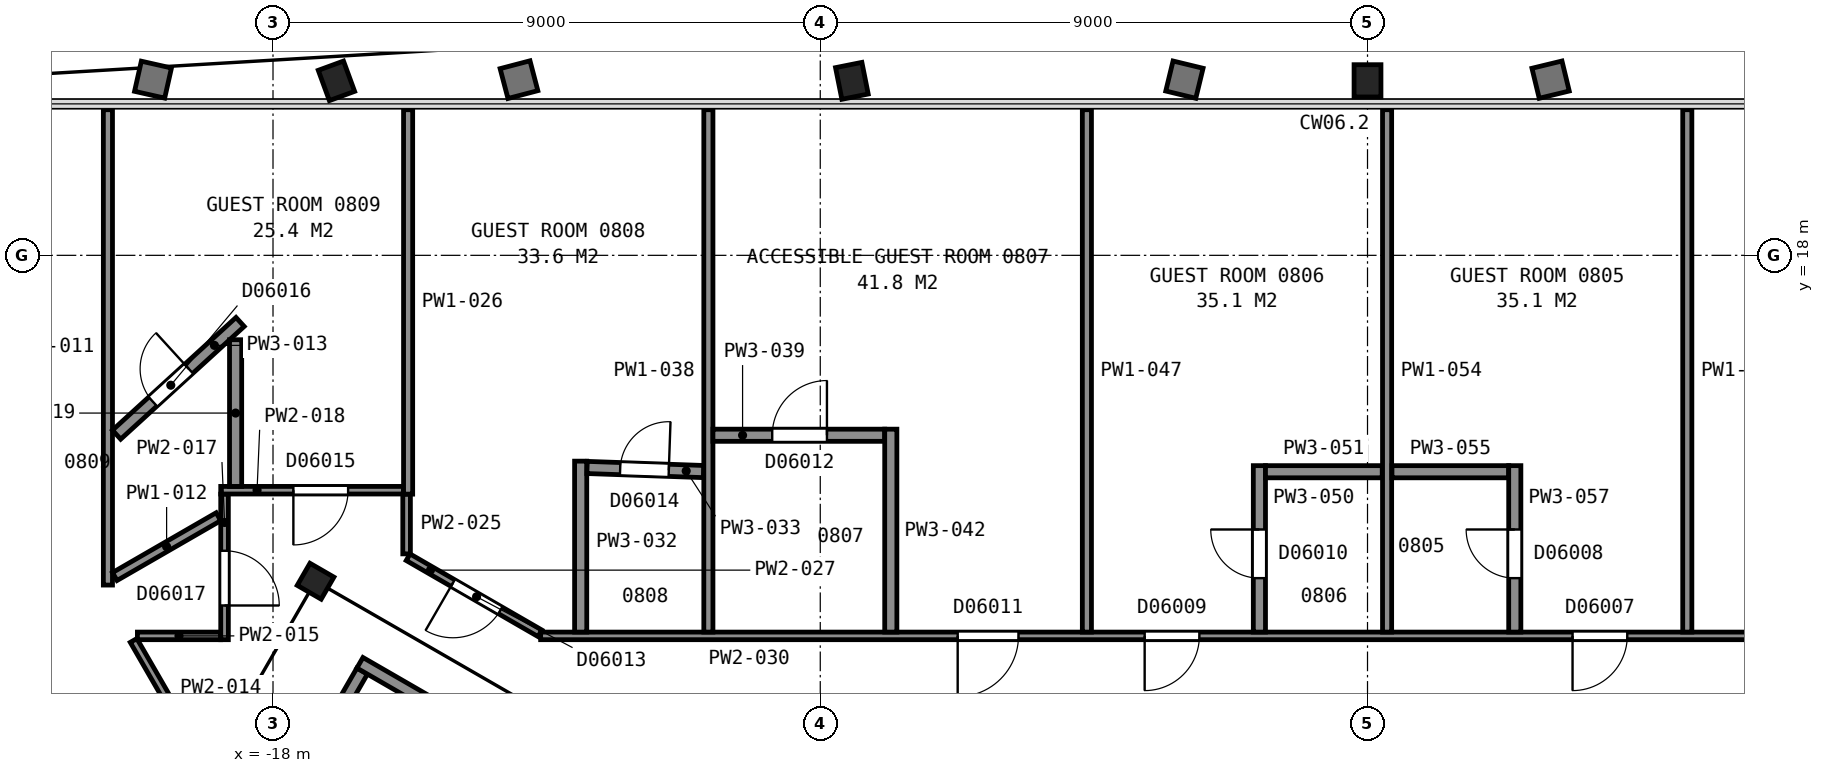
"""IFC4 building model, lengths in metres.
Left out: names, types, materials, properties, quantities, classifications, styles, units other than length and angle.
Written with IfcOpenShell. Run it as: python <this file> out.ifc"""

import sys

from ifc_helpers import new_model, si_unit, direction, frame, frame_2d, origin, origin_2d, place, context, subcontext, project, spatial, rectangle, i_section, extrude, element, fill, save


model = new_model("IFC4")
c1 = context("Model", 3, precision=1e-05, world=origin(), true_north=direction((0.0, 1.0)))
c2 = subcontext(c1, "Body", "Model", "MODEL_VIEW")
j1 = project(units=[si_unit("LENGTHUNIT", "METRE"), si_unit("PLANEANGLEUNIT", "RADIAN")], contexts=[c1])
p1 = place(None, origin())
s1 = spatial("IfcSite", under=j1, at=p1, CompositionType="ELEMENT")
p2 = place(p1, origin())
s2 = spatial("IfcBuilding", under=s1, at=p2, CompositionType="ELEMENT")
p3 = place(p2, frame((0.0, 0.0, 44.0)))
s3 = spatial("IfcBuildingStorey", under=s2, at=p3, CompositionType="ELEMENT", Elevation=44.0)
p4 = place(p3, frame((0.0, 20.772, 0.025), z_axis=(0.0, 0.082994433879, 0.99655001076), x_axis=(1.0, 0.0, 0.0)))
e1 = element("IfcColumn", 1, at=p4, inside=s3, PredefinedType="COLUMN", context=c2, shape_type="SweptSolid", body=[
    extrude(i_section(OverallWidth=0.442, OverallDepth=0.531, WebThickness=0.066, FlangeThickness=0.106, FilletRadius=0.015, at=origin_2d()), origin(), (0.0, 0.0, 1.0), 3.562),
])
p5 = place(p3, frame((-8.46, 20.772, 0.025), z_axis=(-0.016582899458, 0.082983021668, 0.996412979422), x_axis=(0.999861307838, -0.000158913268, 0.016653523173)))
e2 = element("IfcColumn", 2, at=p5, inside=s3, PredefinedType="COLUMN", context=c2, shape_type="SweptSolid", body=[
    extrude(i_section(OverallWidth=0.442, OverallDepth=0.531, WebThickness=0.066, FlangeThickness=0.106, FilletRadius=0.015, at=origin_2d()), origin(), (0.0, 0.0, 1.0), 3.563),
])
p6 = place(p3, frame((-16.921, 20.772, 0.025), z_axis=(-0.030414930255, 0.08295603725, 0.996088965857), x_axis=(0.999534085213, -2.6317342e-05, 0.030522316494)))
e3 = element("IfcColumn", 3, at=p6, inside=s3, PredefinedType="COLUMN", context=c2, shape_type="SweptSolid", body=[
    extrude(i_section(OverallWidth=0.442, OverallDepth=0.531, WebThickness=0.066, FlangeThickness=0.106, FilletRadius=0.015, at=origin_2d()), origin(), (0.0, 0.0, 1.0), 3.564),
])
p7 = place(p3, frame((-17.3, 12.64, 0.0), z_axis=(0.0, 0.0, 1.0), x_axis=(0.5, 0.866025403784, 0.0)))
e4 = element("IfcColumn", 4, at=p7, inside=s3, PredefinedType="COLUMN", context=c2, shape_type="SweptSolid", body=[
    extrude(i_section(OverallWidth=0.419, OverallDepth=0.455, WebThickness=0.042, FlangeThickness=0.068, FilletRadius=0.015, at=origin_2d()), origin(), (0.0, 0.0, 1.0), 3.6),
])
p8 = place(p3, frame((6.178, 5.299, 0.0), z_axis=(0.0, 0.0, 1.0), x_axis=(0.866026010844, 0.49999894854, 0.0)))
e5 = element("IfcWall", 5, at=p8, inside=s3, PredefinedType="PARTITIONING", context=c2, shape_type="SweptSolid", body=[
    extrude(rectangle(XDim=12.0, YDim=0.2, at=frame_2d((6.0, 0.0))), origin(), (0.0, 0.0, 1.0), 3.35),
])
p9 = place(p3, frame((-16.534, 11.162, 0.0), z_axis=(0.0, 0.0, 1.0), x_axis=(-0.49998411664, -0.866034573852, 0.0)))
e6 = element("IfcWall", 6, at=p9, inside=s3, PredefinedType="PARTITIONING", context=c2, shape_type="SweptSolid", body=[
    extrude(rectangle(XDim=2.8, YDim=0.2, at=frame_2d((1.4, 0.0))), origin(), (0.0, 0.0, 1.0), 3.35),
])
p10 = place(p9, frame((0.85, 0.0, 0.0)))
e7 = element("IfcOpeningElement", 7, at=p10, cuts=e6, PredefinedType="OPENING", context=c2, shape_type="SweptSolid", body=[
    extrude(rectangle(XDim=1.1, YDim=2.1, at=frame_2d((0.55, 1.05))), frame((0.0, 0.11, 0.0), z_axis=(0.0, -1.0, 0.0), x_axis=(1.0, 0.0, 0.0)), (0.0, 0.0, 1.0), 0.22),
])
p11 = place(p3, frame((-6.178, 5.299, 0.0), z_axis=(0.0, 0.0, 1.0), x_axis=(-0.866026010844, 0.49999894854, 0.0)))
e8 = element("IfcWall", 8, at=p11, inside=s3, PredefinedType="PARTITIONING", context=c2, shape_type="SweptSolid", body=[
    extrude(rectangle(XDim=12.0, YDim=0.2, at=frame_2d((6.0, 0.0))), origin(), (0.0, 0.0, 1.0), 3.35),
])
p12 = place(p3, frame((-20.715, 12.577, 0.0), z_axis=(0.0, 0.0, 1.0), x_axis=(0.0, 1.0, 0.0)))
e9 = element("IfcWall", 9, at=p12, inside=s3, PredefinedType="PARTITIONING", context=c2, shape_type="SweptSolid", body=[
    extrude(rectangle(XDim=7.818, YDim=0.15, at=frame_2d((3.909, 0.0))), origin(), (0.0, 0.0, 1.0), 2.613),
])
p13 = place(p3, frame((-20.602, 12.717, 0.0), z_axis=(0.0, 0.0, 1.0), x_axis=(0.866121584746, 0.499833372672, 0.0)))
e10 = element("IfcWall", 10, at=p13, inside=s3, PredefinedType="PARTITIONING", context=c2, shape_type="SweptSolid", body=[
    extrude(rectangle(XDim=1.969, YDim=0.15, at=frame_2d((0.984, 0.0))), origin(), (0.0, 0.0, 1.0), 2.613),
])
p14 = place(p3, frame((-18.541, 16.905, 0.0), z_axis=(0.0, 0.0, 1.0), x_axis=(-0.738508553587, -0.674244107337, 0.0)))
e11 = element("IfcWall", 11, at=p14, inside=s3, PredefinedType="PARTITIONING", context=c2, shape_type="SweptSolid", body=[
    extrude(rectangle(XDim=2.75, YDim=0.2, at=frame_2d((1.375, 0.0))), origin(), (0.0, 0.0, 1.0), 2.613),
])
p15 = place(p14, frame((1.143, 0.0, 0.0)))
e12 = element("IfcOpeningElement", 12, at=p15, cuts=e11, PredefinedType="OPENING", context=c2, shape_type="SweptSolid", body=[
    extrude(rectangle(XDim=0.8, YDim=2.1, at=frame_2d((0.4, 1.05))), frame((0.0, 0.11, 0.0), z_axis=(0.0, -1.0, 0.0), x_axis=(1.0, 0.0, 0.0)), (0.0, 0.0, 1.0), 0.22),
])
p16 = place(p3, frame((-20.293, 11.666, 0.0), z_axis=(0.0, 0.0, 1.0), x_axis=(0.500327160669, -0.865836435071, 0.0)))
e13 = element("IfcWall", 13, at=p16, inside=s3, PredefinedType="PARTITIONING", context=c2, shape_type="SweptSolid", body=[
    extrude(rectangle(XDim=1.805, YDim=0.125, at=frame_2d((0.903, 0.0))), origin(), (0.0, 0.0, 1.0), 2.613),
])
p17 = place(p3, frame((-20.23, 11.741, 0.0), z_axis=(0.0, 0.0, 1.0), x_axis=(1.0, 0.0, 0.0)))
e14 = element("IfcWall", 14, at=p17, inside=s3, PredefinedType="PARTITIONING", context=c2, shape_type="SweptSolid", body=[
    extrude(rectangle(XDim=1.368, YDim=0.125, at=frame_2d((0.684, 0.0))), origin(), (0.0, 0.0, 1.0), 2.613),
])
p18 = place(p3, frame((-18.797, 11.678, 0.0), z_axis=(0.0, 0.0, 1.0), x_axis=(0.0, 1.0, 0.0)))
e15 = element("IfcWall", 15, at=p18, inside=s3, PredefinedType="PARTITIONING", context=c2, shape_type="SweptSolid", body=[
    extrude(rectangle(XDim=2.394, YDim=0.125, at=frame_2d((1.197, 0.0))), origin(), (0.0, 0.0, 1.0), 2.613),
])
p19 = place(p18, frame((0.562, 0.0, 0.0)))
e16 = element("IfcOpeningElement", 16, at=p19, cuts=e15, PredefinedType="OPENING", context=c2, shape_type="SweptSolid", body=[
    extrude(rectangle(XDim=0.9, YDim=2.1, at=frame_2d((0.45, 1.05))), frame((0.0, 0.073, 0.0), z_axis=(0.0, -1.0, 0.0), x_axis=(1.0, 0.0, 0.0)), (0.0, 0.0, 1.0), 0.145),
])
p20 = place(p3, frame((-18.86, 14.137, 0.0), z_axis=(0.0, 0.0, 1.0), x_axis=(1.0, 0.0, 0.0)))
e17 = element("IfcWall", 17, at=p20, inside=s3, PredefinedType="PARTITIONING", context=c2, shape_type="SweptSolid", body=[
    extrude(rectangle(XDim=3.004, YDim=0.125, at=frame_2d((1.502, 0.0))), origin(), (0.0, 0.0, 1.0), 2.613),
])
p21 = place(p20, frame((1.195, 0.0, 0.0)))
e18 = element("IfcOpeningElement", 18, at=p21, cuts=e17, PredefinedType="OPENING", context=c2, shape_type="SweptSolid", body=[
    extrude(rectangle(XDim=0.9, YDim=2.1, at=frame_2d((0.45, 1.05))), frame((0.0, 0.073, 0.0), z_axis=(0.0, -1.0, 0.0), x_axis=(1.0, 0.0, 0.0)), (0.0, 0.0, 1.0), 0.145),
])
p22 = place(p3, frame((-18.615, 14.199, 0.0), z_axis=(0.0, 0.0, 1.0), x_axis=(0.0, 1.0, 0.0)))
e19 = element("IfcWall", 19, at=p22, inside=s3, PredefinedType="PARTITIONING", context=c2, shape_type="SweptSolid", body=[
    extrude(rectangle(XDim=2.413, YDim=0.2, at=frame_2d((1.206, 0.0))), origin(), (0.0, 0.0, 1.0), 2.613),
])
p23 = place(p3, frame((-15.803, 13.09, 0.0), z_axis=(0.0, 0.0, 1.0), x_axis=(0.0, 1.0, 0.0)))
e20 = element("IfcWall", 20, at=p23, inside=s3, PredefinedType="PARTITIONING", context=c2, shape_type="SweptSolid", body=[
    extrude(rectangle(XDim=0.982, YDim=0.125, at=frame_2d((0.491, 0.0))), origin(), (0.0, 0.0, 1.0), 2.613),
])
p24 = place(p3, frame((-15.778, 14.073, 0.0), z_axis=(0.0, 0.0, 1.0), x_axis=(0.0, 1.0, 0.0)))
e21 = element("IfcWall", 21, at=p24, inside=s3, PredefinedType="PARTITIONING", context=c2, shape_type="SweptSolid", body=[
    extrude(rectangle(XDim=6.323, YDim=0.15, at=frame_2d((3.161, 0.0))), origin(), (0.0, 0.0, 1.0), 2.613),
])
p25 = place(p3, frame((-15.778, 13.035, 0.0), z_axis=(0.0, 0.0, 1.0), x_axis=(0.866110899347, -0.499851888094, 0.0)))
e22 = element("IfcWall", 22, at=p25, inside=s3, PredefinedType="PARTITIONING", context=c2, shape_type="SweptSolid", body=[
    extrude(rectangle(XDim=2.504, YDim=0.125, at=frame_2d((1.252, 0.0))), origin(), (0.0, 0.0, 1.0), 2.613),
])
p26 = place(p25, frame((0.85, 0.0, 0.0)))
e23 = element("IfcOpeningElement", 23, at=p26, cuts=e22, PredefinedType="OPENING", context=c2, shape_type="SweptSolid", body=[
    extrude(rectangle(XDim=0.9, YDim=2.1, at=frame_2d((0.45, 1.05))), frame((0.0, 0.073, 0.0), z_axis=(0.0, -1.0, 0.0), x_axis=(1.0, 0.0, 0.0)), (0.0, 0.0, 1.0), 0.145),
])
p27 = place(p3, frame((-13.598, 11.741, 0.0), z_axis=(0.0, 0.0, 1.0), x_axis=(1.0, 0.0, 0.0)))
e24 = element("IfcWall", 24, at=p27, inside=s3, PredefinedType="PARTITIONING", context=c2, shape_type="SweptSolid", body=[
    extrude(rectangle(XDim=27.197, YDim=0.125, at=frame_2d((13.598, 0.0))), origin(), (0.0, 0.0, 1.0), 2.613),
])
p28 = place(p27, frame((20.107, 0.0, 0.0)))
e25 = element("IfcOpeningElement", 25, at=p28, cuts=e24, PredefinedType="OPENING", context=c2, shape_type="SweptSolid", body=[
    extrude(rectangle(XDim=0.9, YDim=2.1, at=frame_2d((0.45, 1.05))), frame((0.0, 0.073, 0.0), z_axis=(0.0, -1.0, 0.0), x_axis=(1.0, 0.0, 0.0)), (0.0, 0.0, 1.0), 0.145),
])
p29 = place(p27, frame((16.97, 0.0, 0.0)))
e26 = element("IfcOpeningElement", 26, at=p29, cuts=e24, PredefinedType="OPENING", context=c2, shape_type="SweptSolid", body=[
    extrude(rectangle(XDim=0.9, YDim=2.1, at=frame_2d((0.45, 1.05))), frame((0.0, 0.073, 0.0), z_axis=(0.0, -1.0, 0.0), x_axis=(1.0, 0.0, 0.0)), (0.0, 0.0, 1.0), 0.145),
])
p30 = place(p27, frame((9.934, 0.0, 0.0)))
e27 = element("IfcOpeningElement", 27, at=p30, cuts=e24, PredefinedType="OPENING", context=c2, shape_type="SweptSolid", body=[
    extrude(rectangle(XDim=0.9, YDim=2.1, at=frame_2d((0.45, 1.05))), frame((0.0, 0.073, 0.0), z_axis=(0.0, -1.0, 0.0), x_axis=(1.0, 0.0, 0.0)), (0.0, 0.0, 1.0), 0.145),
])
p31 = place(p27, frame((6.858, 0.0, 0.0)))
e28 = element("IfcOpeningElement", 28, at=p31, cuts=e24, PredefinedType="OPENING", context=c2, shape_type="SweptSolid", body=[
    extrude(rectangle(XDim=1.0, YDim=2.1, at=frame_2d((0.5, 1.05))), frame((0.0, 0.073, 0.0), z_axis=(0.0, -1.0, 0.0), x_axis=(1.0, 0.0, 0.0)), (0.0, 0.0, 1.0), 0.145),
])
p32 = place(p3, frame((-12.94, 11.803, 0.0), z_axis=(0.0, 0.0, 1.0), x_axis=(0.0, 1.0, 0.0)))
e29 = element("IfcWall", 29, at=p32, inside=s3, PredefinedType="PARTITIONING", context=c2, shape_type="SweptSolid", body=[
    extrude(rectangle(XDim=2.812, YDim=0.2, at=frame_2d((1.406, 0.0))), origin(), (0.0, 0.0, 1.0), 2.613),
])
p33 = place(p3, frame((-10.918, 14.444, 0.0), z_axis=(0.0, 0.0, 1.0), x_axis=(-0.999382486529, 0.035137524367, 0.0)))
e30 = element("IfcWall", 30, at=p33, inside=s3, PredefinedType="PARTITIONING", context=c2, shape_type="SweptSolid", body=[
    extrude(rectangle(XDim=1.918, YDim=0.2, at=frame_2d((0.959, 0.0))), origin(), (0.0, 0.0, 1.0), 2.613),
])
p34 = place(p33, frame((0.573, 0.0, 0.0)))
e31 = element("IfcOpeningElement", 31, at=p34, cuts=e30, PredefinedType="OPENING", context=c2, shape_type="SweptSolid", body=[
    extrude(rectangle(XDim=0.8, YDim=2.1, at=frame_2d((0.4, 1.05))), frame((0.0, 0.11, 0.0), z_axis=(0.0, -1.0, 0.0), x_axis=(1.0, 0.0, 0.0)), (0.0, 0.0, 1.0), 0.22),
])
p35 = place(p3, frame((-10.84, 11.803, 0.0), z_axis=(0.0, 0.0, 1.0), x_axis=(0.0, 1.0, 0.0)))
e32 = element("IfcWall", 32, at=p35, inside=s3, PredefinedType="PARTITIONING", context=c2, shape_type="SweptSolid", body=[
    extrude(rectangle(XDim=8.592, YDim=0.15, at=frame_2d((4.296, 0.0))), origin(), (0.0, 0.0, 1.0), 2.613),
])
p36 = place(p3, frame((-7.94, 15.041, 0.0), z_axis=(0.0, 0.0, 1.0), x_axis=(-1.0, 0.0, 0.0)))
e33 = element("IfcWall", 33, at=p36, inside=s3, PredefinedType="PARTITIONING", context=c2, shape_type="SweptSolid", body=[
    extrude(rectangle(XDim=2.825, YDim=0.2, at=frame_2d((1.413, 0.0))), origin(), (0.0, 0.0, 1.0), 2.613),
])
p37 = place(p36, frame((0.95, 0.0, 0.0)))
e34 = element("IfcOpeningElement", 34, at=p37, cuts=e33, PredefinedType="OPENING", context=c2, shape_type="SweptSolid", body=[
    extrude(rectangle(XDim=0.9, YDim=2.1, at=frame_2d((0.45, 1.05))), frame((0.0, 0.11, 0.0), z_axis=(0.0, -1.0, 0.0), x_axis=(1.0, 0.0, 0.0)), (0.0, 0.0, 1.0), 0.22),
])
p38 = place(p3, frame((-7.84, 11.803, 0.0), z_axis=(0.0, 0.0, 1.0), x_axis=(0.0, 1.0, 0.0)))
e35 = element("IfcWall", 35, at=p38, inside=s3, PredefinedType="PARTITIONING", context=c2, shape_type="SweptSolid", body=[
    extrude(rectangle(XDim=3.338, YDim=0.2, at=frame_2d((1.669, 0.0))), origin(), (0.0, 0.0, 1.0), 2.613),
])
p39 = place(p3, frame((-4.615, 11.803, 0.0), z_axis=(0.0, 0.0, 1.0), x_axis=(0.0, 1.0, 0.0)))
e36 = element("IfcWall", 36, at=p39, inside=s3, PredefinedType="PARTITIONING", context=c2, shape_type="SweptSolid", body=[
    extrude(rectangle(XDim=8.592, YDim=0.15, at=frame_2d((4.296, 0.0))), origin(), (0.0, 0.0, 1.0), 2.613),
])
p40 = place(p3, frame((-1.778, 14.541, 0.0), z_axis=(0.0, 0.0, 1.0), x_axis=(0.0, -1.0, 0.0)))
e37 = element("IfcWall", 37, at=p40, inside=s3, PredefinedType="PARTITIONING", context=c2, shape_type="SweptSolid", body=[
    extrude(rectangle(XDim=2.738, YDim=0.2, at=frame_2d((1.369, 0.0))), origin(), (0.0, 0.0, 1.0), 2.613),
])
p41 = place(p40, frame((1.05, 0.0, 0.0)))
e38 = element("IfcOpeningElement", 38, at=p41, cuts=e37, PredefinedType="OPENING", context=c2, shape_type="SweptSolid", body=[
    extrude(rectangle(XDim=0.8, YDim=2.1, at=frame_2d((0.4, 1.05))), frame((0.0, 0.11, 0.0), z_axis=(0.0, -1.0, 0.0), x_axis=(1.0, 0.0, 0.0)), (0.0, 0.0, 1.0), 0.22),
])
p42 = place(p3, frame((-1.678, 14.441, 0.0), z_axis=(0.0, 0.0, 1.0), x_axis=(1.0, 0.0, 0.0)))
e39 = element("IfcWall", 39, at=p42, inside=s3, PredefinedType="PARTITIONING", context=c2, shape_type="SweptSolid", body=[
    extrude(rectangle(XDim=1.92, YDim=0.2, at=frame_2d((0.96, 0.0))), origin(), (0.0, 0.0, 1.0), 2.613),
])
p43 = place(p3, frame((0.322, 11.803, 0.0), z_axis=(0.0, 0.0, 1.0), x_axis=(0.0, 1.0, 0.0)))
e40 = element("IfcWall", 40, at=p43, inside=s3, PredefinedType="PARTITIONING", context=c2, shape_type="SweptSolid", body=[
    extrude(rectangle(XDim=8.592, YDim=0.15, at=frame_2d((4.296, 0.0))), origin(), (0.0, 0.0, 1.0), 2.613),
])
p44 = place(p3, frame((0.402, 14.441, 0.0), z_axis=(0.0, 0.0, 1.0), x_axis=(1.0, 0.0, 0.0)))
e41 = element("IfcWall", 41, at=p44, inside=s3, PredefinedType="PARTITIONING", context=c2, shape_type="SweptSolid", body=[
    extrude(rectangle(XDim=1.92, YDim=0.2, at=frame_2d((0.96, 0.0))), origin(), (0.0, 0.0, 1.0), 2.613),
])
p45 = place(p3, frame((2.422, 11.803, 0.0), z_axis=(0.0, 0.0, 1.0), x_axis=(0.0, 1.0, 0.0)))
e42 = element("IfcWall", 42, at=p45, inside=s3, PredefinedType="PARTITIONING", context=c2, shape_type="SweptSolid", body=[
    extrude(rectangle(XDim=2.738, YDim=0.2, at=frame_2d((1.369, 0.0))), origin(), (0.0, 0.0, 1.0), 2.613),
])
p46 = place(p45, frame((0.887, 0.0, 0.0)))
e43 = element("IfcOpeningElement", 43, at=p46, cuts=e42, PredefinedType="OPENING", context=c2, shape_type="SweptSolid", body=[
    extrude(rectangle(XDim=0.8, YDim=2.1, at=frame_2d((0.4, 1.05))), frame((0.0, 0.11, 0.0), z_axis=(0.0, -1.0, 0.0), x_axis=(1.0, 0.0, 0.0)), (0.0, 0.0, 1.0), 0.22),
])
p47 = place(p3, frame((5.259, 11.803, 0.0), z_axis=(0.0, 0.0, 1.0), x_axis=(0.0, 1.0, 0.0)))
e44 = element("IfcWall", 44, at=p47, inside=s3, PredefinedType="PARTITIONING", context=c2, shape_type="SweptSolid", body=[
    extrude(rectangle(XDim=8.592, YDim=0.15, at=frame_2d((4.296, 0.0))), origin(), (0.0, 0.0, 1.0), 2.613),
])
p48 = place(p15, origin())
e45 = element("IfcDoor", 45, at=p48, inside=s3, OperationType="SINGLE_SWING_LEFT", PredefinedType="DOOR", context=c2, shape_type="SweptSolid", body=[
    extrude(rectangle(XDim=0.8, YDim=2.1, at=frame_2d((0.4, 1.05))), frame((0.0, 0.025, 0.0), z_axis=(0.0, -1.0, 0.0), x_axis=(1.0, 0.0, 0.0)), (0.0, 0.0, 1.0), 0.05),
])
fill(e12, e45)
p49 = place(p19, origin())
e46 = element("IfcDoor", 46, at=p49, inside=s3, OperationType="SINGLE_SWING_LEFT", PredefinedType="DOOR", context=c2, shape_type="SweptSolid", body=[
    extrude(rectangle(XDim=0.9, YDim=2.1, at=frame_2d((0.45, 1.05))), frame((0.0, 0.025, 0.0), z_axis=(0.0, -1.0, 0.0), x_axis=(1.0, 0.0, 0.0)), (0.0, 0.0, 1.0), 0.05),
])
fill(e16, e46)
p50 = place(p21, origin())
e47 = element("IfcDoor", 47, at=p50, inside=s3, OperationType="SINGLE_SWING_LEFT", PredefinedType="DOOR", context=c2, shape_type="SweptSolid", body=[
    extrude(rectangle(XDim=0.9, YDim=2.1, at=frame_2d((0.45, 1.05))), frame((0.0, 0.025, 0.0), z_axis=(0.0, -1.0, 0.0), x_axis=(1.0, 0.0, 0.0)), (0.0, 0.0, 1.0), 0.05),
])
fill(e18, e47)
p51 = place(p26, origin())
e48 = element("IfcDoor", 48, at=p51, inside=s3, OperationType="SINGLE_SWING_LEFT", PredefinedType="DOOR", context=c2, shape_type="SweptSolid", body=[
    extrude(rectangle(XDim=0.9, YDim=2.1, at=frame_2d((0.45, 1.05))), frame((0.0, 0.025, 0.0), z_axis=(0.0, -1.0, 0.0), x_axis=(1.0, 0.0, 0.0)), (0.0, 0.0, 1.0), 0.05),
])
fill(e23, e48)
p52 = place(p29, origin())
e49 = element("IfcDoor", 49, at=p52, inside=s3, OperationType="SINGLE_SWING_LEFT", PredefinedType="DOOR", context=c2, shape_type="SweptSolid", body=[
    extrude(rectangle(XDim=0.9, YDim=2.1, at=frame_2d((0.45, 1.05))), frame((0.0, 0.025, 0.0), z_axis=(0.0, -1.0, 0.0), x_axis=(1.0, 0.0, 0.0)), (0.0, 0.0, 1.0), 0.05),
])
fill(e26, e49)
p53 = place(p30, origin())
e50 = element("IfcDoor", 50, at=p53, inside=s3, OperationType="SINGLE_SWING_LEFT", PredefinedType="DOOR", context=c2, shape_type="SweptSolid", body=[
    extrude(rectangle(XDim=0.9, YDim=2.1, at=frame_2d((0.45, 1.05))), frame((0.0, 0.025, 0.0), z_axis=(0.0, -1.0, 0.0), x_axis=(1.0, 0.0, 0.0)), (0.0, 0.0, 1.0), 0.05),
])
fill(e27, e50)
p54 = place(p31, origin())
e51 = element("IfcDoor", 51, at=p54, inside=s3, OperationType="SINGLE_SWING_LEFT", PredefinedType="DOOR", context=c2, shape_type="SweptSolid", body=[
    extrude(rectangle(XDim=1.0, YDim=2.1, at=frame_2d((0.5, 1.05))), frame((0.0, 0.025, 0.0), z_axis=(0.0, -1.0, 0.0), x_axis=(1.0, 0.0, 0.0)), (0.0, 0.0, 1.0), 0.05),
])
fill(e28, e51)
p55 = place(p34, origin())
e52 = element("IfcDoor", 52, at=p55, inside=s3, OperationType="SINGLE_SWING_LEFT", PredefinedType="DOOR", context=c2, shape_type="SweptSolid", body=[
    extrude(rectangle(XDim=0.8, YDim=2.1, at=frame_2d((0.4, 1.05))), frame((0.0, 0.025, 0.0), z_axis=(0.0, -1.0, 0.0), x_axis=(1.0, 0.0, 0.0)), (0.0, 0.0, 1.0), 0.05),
])
fill(e31, e52)
p56 = place(p37, origin())
e53 = element("IfcDoor", 53, at=p56, inside=s3, OperationType="SINGLE_SWING_LEFT", PredefinedType="DOOR", context=c2, shape_type="SweptSolid", body=[
    extrude(rectangle(XDim=0.9, YDim=2.1, at=frame_2d((0.45, 1.05))), frame((0.0, 0.025, 0.0), z_axis=(0.0, -1.0, 0.0), x_axis=(1.0, 0.0, 0.0)), (0.0, 0.0, 1.0), 0.05),
])
fill(e34, e53)
p57 = place(p41, origin())
e54 = element("IfcDoor", 54, at=p57, inside=s3, OperationType="SINGLE_SWING_LEFT", PredefinedType="DOOR", context=c2, shape_type="SweptSolid", body=[
    extrude(rectangle(XDim=0.8, YDim=2.1, at=frame_2d((0.4, 1.05))), frame((0.0, 0.025, 0.0), z_axis=(0.0, -1.0, 0.0), x_axis=(1.0, 0.0, 0.0)), (0.0, 0.0, 1.0), 0.05),
])
fill(e38, e54)
p58 = place(p46, origin())
e55 = element("IfcDoor", 55, at=p58, inside=s3, OperationType="SINGLE_SWING_RIGHT", PredefinedType="DOOR", context=c2, shape_type="SweptSolid", body=[
    extrude(rectangle(XDim=0.8, YDim=2.1, at=frame_2d((0.4, 1.05))), frame((0.0, 0.025, 0.0), z_axis=(0.0, -1.0, 0.0), x_axis=(1.0, 0.0, 0.0)), (0.0, 0.0, 1.0), 0.05),
])
fill(e43, e55)
save(model, sys.argv[1])
